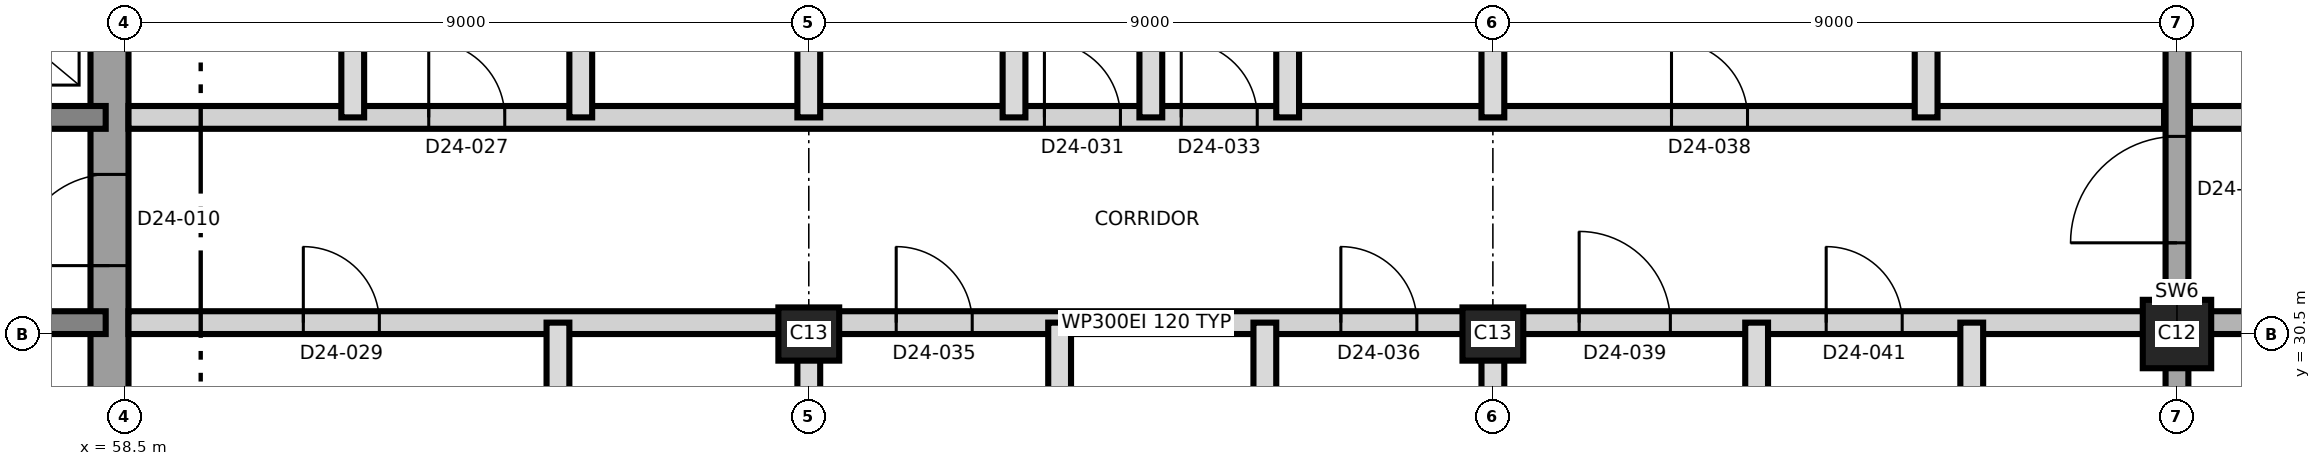
"""IFC4 building model, lengths in metres.
Left out: names, types, materials, properties, quantities, classifications, styles, units other than length and angle.
Written with IfcOpenShell. Run it as: python <this file> out.ifc"""

import sys

from ifc_helpers import new_model, si_unit, direction, frame, frame_2d, origin, origin_2d, place, context, subcontext, project, spatial, rectangle, extrude, element, fill, save


model = new_model("IFC4")
c1 = context("Model", 3, precision=1e-05, world=origin(), true_north=direction((0.0, 1.0)))
c2 = subcontext(c1, "Body", "Model", "MODEL_VIEW")
j1 = project(units=[si_unit("LENGTHUNIT", "METRE"), si_unit("PLANEANGLEUNIT", "RADIAN")], contexts=[c1])
p1 = place(None, origin())
s1 = spatial("IfcSite", under=j1, at=p1, CompositionType="ELEMENT")
p2 = place(p1, origin())
s2 = spatial("IfcBuilding", under=s1, at=p2, CompositionType="ELEMENT")
p3 = place(p2, frame((0.0, 0.0, 221.7)))
s3 = spatial("IfcBuildingStorey", under=s2, at=p3, CompositionType="ELEMENT", Elevation=221.7)
p4 = place(p3, frame((58.3, 21.25, 0.0), z_axis=(0.0, 0.0, 1.0), x_axis=(0.0, 1.0, 0.0)))
e1 = element("IfcWall", 1, at=p4, inside=s3, PredefinedType="SHEAR", context=c2, shape_type="SweptSolid", body=[
    extrude(rectangle(XDim=18.5, YDim=0.5, at=frame_2d((9.25, 0.0))), origin(), (0.0, 0.0, 1.0), 3.7),
])
p5 = place(p4, frame((10.15, 0.0, 0.0)))
e2 = element("IfcOpeningElement", 2, at=p5, cuts=e1, PredefinedType="OPENING", context=c2, shape_type="SweptSolid", body=[
    extrude(rectangle(XDim=1.2, YDim=2.1, at=frame_2d((0.6, 1.05))), frame((0.0, 0.26, 0.0), z_axis=(0.0, -1.0, 0.0), x_axis=(1.0, 0.0, 0.0)), (0.0, 0.0, 1.0), 0.52),
])
p6 = place(p3, frame((31.75, 30.65, 0.0), z_axis=(0.0, 0.0, 1.0), x_axis=(1.0, 0.0, 0.0)))
e3 = element("IfcWall", 3, at=p6, inside=s3, PredefinedType="SHEAR", context=c2, shape_type="SweptSolid", body=[
    extrude(rectangle(XDim=26.5, YDim=0.3, at=frame_2d((13.25, 0.0))), origin(), (0.0, 0.0, 1.0), 3.7),
])
p7 = place(p6, frame((24.75, 0.0, 0.0)))
e4 = element("IfcOpeningElement", 4, at=p7, cuts=e3, PredefinedType="OPENING", context=c2, shape_type="SweptSolid", body=[
    extrude(rectangle(XDim=1.0, YDim=2.1, at=frame_2d((0.5, 1.05))), frame((0.0, 0.16, 0.0), z_axis=(0.0, -1.0, 0.0), x_axis=(1.0, 0.0, 0.0)), (0.0, 0.0, 1.0), 0.32),
])
p8 = place(p3, frame((31.75, 33.35, 0.0), z_axis=(0.0, 0.0, 1.0), x_axis=(1.0, 0.0, 0.0)))
e5 = element("IfcWall", 5, at=p8, inside=s3, PredefinedType="SHEAR", context=c2, shape_type="SweptSolid", body=[
    extrude(rectangle(XDim=26.5, YDim=0.3, at=frame_2d((13.25, 0.0))), origin(), (0.0, 0.0, 1.0), 3.7),
])
p9 = place(p8, frame((13.9, 0.0, 0.0)))
e6 = element("IfcOpeningElement", 6, at=p9, cuts=e5, PredefinedType="OPENING", context=c2, shape_type="SweptSolid", body=[
    extrude(rectangle(XDim=1.4, YDim=2.1, at=frame_2d((0.7, 1.05))), frame((0.0, 0.16, 0.0), z_axis=(0.0, -1.0, 0.0), x_axis=(1.0, 0.0, 0.0)), (0.0, 0.0, 1.0), 0.32),
])
p10 = place(p8, frame((5.375, 0.0, 0.0)))
e7 = element("IfcOpeningElement", 7, at=p10, cuts=e5, PredefinedType="OPENING", context=c2, shape_type="SweptSolid", body=[
    extrude(rectangle(XDim=1.2, YDim=2.1, at=frame_2d((0.6, 1.05))), frame((0.0, 0.16, 0.0), z_axis=(0.0, -1.0, 0.0), x_axis=(1.0, 0.0, 0.0)), (0.0, 0.0, 1.0), 0.32),
])
p11 = place(p8, frame((19.925, 0.0, 0.0)))
e8 = element("IfcOpeningElement", 8, at=p11, cuts=e5, PredefinedType="OPENING", context=c2, shape_type="SweptSolid", body=[
    extrude(rectangle(XDim=1.2, YDim=2.1, at=frame_2d((0.6, 1.05))), frame((0.0, 0.16, 0.0), z_axis=(0.0, -1.0, 0.0), x_axis=(1.0, 0.0, 0.0)), (0.0, 0.0, 1.0), 0.32),
])
for number, where, z_axis, x_axis in (
    (9, (67.5, 30.5, 0.0), (0.0, 0.0, 1.0), (1.0, 0.0, 0.0)),
    (10, (76.5, 30.5, 0.0), (0.0, 0.0, 1.0), (1.0, 0.0, 0.0)),
):
    element("IfcColumn", number, at=place(p3, frame(where, z_axis=z_axis, x_axis=x_axis)), inside=s3, PredefinedType="COLUMN", context=c2, shape_type="SweptSolid", body=[
        extrude(rectangle(XDim=0.8, YDim=0.7, at=origin_2d()), origin(), (0.0, 0.0, 1.0), 3.7),
    ])
p12 = place(p3, frame((85.5, 30.5, 0.0), z_axis=(0.0, 0.0, 1.0), x_axis=(1.0, 0.0, 0.0)))
e11 = element("IfcColumn", 11, at=p12, inside=s3, PredefinedType="COLUMN", context=c2, shape_type="SweptSolid", body=[
    extrude(rectangle(XDim=0.9, YDim=0.9, at=origin_2d()), origin(), (0.0, 0.0, 1.0), 3.7),
])
p13 = place(p3, frame((85.5, 21.53, 0.0), z_axis=(0.0, 0.0, 1.0), x_axis=(0.0, 1.0, 0.0)))
e12 = element("IfcWall", 12, at=p13, inside=s3, PredefinedType="SHEAR", context=c2, shape_type="SweptSolid", body=[
    extrude(rectangle(XDim=17.94, YDim=0.3, at=frame_2d((8.97, 0.0))), origin(), (0.0, 0.0, 1.0), 3.7),
])
p14 = place(p13, frame((10.17, 0.0, 0.0)))
e13 = element("IfcOpeningElement", 13, at=p14, cuts=e12, PredefinedType="OPENING", context=c2, shape_type="SweptSolid", body=[
    extrude(rectangle(XDim=1.4, YDim=2.1, at=frame_2d((0.7, 1.05))), frame((0.0, 0.16, 0.0), z_axis=(0.0, -1.0, 0.0), x_axis=(1.0, 0.0, 0.0)), (0.0, 0.0, 1.0), 0.32),
])
p15 = place(p3, frame((58.55, 30.65, 0.0), z_axis=(0.0, 0.0, 1.0), x_axis=(1.0, 0.0, 0.0)))
e14 = element("IfcWall", 14, at=p15, inside=s3, PredefinedType="PARTITIONING", context=c2, shape_type="SweptSolid", body=[
    extrude(rectangle(XDim=26.78, YDim=0.3, at=frame_2d((13.39, 0.0))), origin(), (0.0, 0.0, 1.0), 3.4),
])
p16 = place(p15, frame((2.3, 0.0, 0.0)))
e15 = element("IfcOpeningElement", 15, at=p16, cuts=e14, PredefinedType="OPENING", context=c2, shape_type="SweptSolid", body=[
    extrude(rectangle(XDim=1.0, YDim=2.4, at=frame_2d((0.5, 1.2))), frame((0.0, 0.16, 0.0), z_axis=(0.0, -1.0, 0.0), x_axis=(1.0, 0.0, 0.0)), (0.0, 0.0, 1.0), 0.32),
])
p17 = place(p15, frame((10.1, 0.0, 0.0)))
e16 = element("IfcOpeningElement", 16, at=p17, cuts=e14, PredefinedType="OPENING", context=c2, shape_type="SweptSolid", body=[
    extrude(rectangle(XDim=1.0, YDim=2.1, at=frame_2d((0.5, 1.05))), frame((0.0, 0.16, 0.0), z_axis=(0.0, -1.0, 0.0), x_axis=(1.0, 0.0, 0.0)), (0.0, 0.0, 1.0), 0.32),
])
p18 = place(p15, frame((15.95, 0.0, 0.0)))
e17 = element("IfcOpeningElement", 17, at=p18, cuts=e14, PredefinedType="OPENING", context=c2, shape_type="SweptSolid", body=[
    extrude(rectangle(XDim=1.0, YDim=2.1, at=frame_2d((0.5, 1.05))), frame((0.0, 0.16, 0.0), z_axis=(0.0, -1.0, 0.0), x_axis=(1.0, 0.0, 0.0)), (0.0, 0.0, 1.0), 0.32),
])
p19 = place(p15, frame((19.085, 0.0, 0.0)))
e18 = element("IfcOpeningElement", 18, at=p19, cuts=e14, PredefinedType="OPENING", context=c2, shape_type="SweptSolid", body=[
    extrude(rectangle(XDim=1.2, YDim=2.1, at=frame_2d((0.6, 1.05))), frame((0.0, 0.16, 0.0), z_axis=(0.0, -1.0, 0.0), x_axis=(1.0, 0.0, 0.0)), (0.0, 0.0, 1.0), 0.32),
])
p20 = place(p15, frame((22.335, 0.0, 0.0)))
e19 = element("IfcOpeningElement", 19, at=p20, cuts=e14, PredefinedType="OPENING", context=c2, shape_type="SweptSolid", body=[
    extrude(rectangle(XDim=1.0, YDim=2.1, at=frame_2d((0.5, 1.05))), frame((0.0, 0.16, 0.0), z_axis=(0.0, -1.0, 0.0), x_axis=(1.0, 0.0, 0.0)), (0.0, 0.0, 1.0), 0.32),
])
p21 = place(p3, frame((85.67, 30.65, 0.0), z_axis=(0.0, 0.0, 1.0), x_axis=(1.0, 0.0, 0.0)))
e20 = element("IfcWall", 20, at=p21, inside=s3, PredefinedType="SHEAR", context=c2, shape_type="SweptSolid", body=[
    extrude(rectangle(XDim=8.8, YDim=0.3, at=frame_2d((4.4, 0.0))), origin(), (0.0, 0.0, 1.0), 3.4),
])
p22 = place(p21, frame((2.08, 0.0, 0.0)))
e21 = element("IfcOpeningElement", 21, at=p22, cuts=e20, PredefinedType="OPENING", context=c2, shape_type="SweptSolid", body=[
    extrude(rectangle(XDim=1.2, YDim=2.1, at=frame_2d((0.6, 1.05))), frame((0.0, 0.16, 0.0), z_axis=(0.0, -1.0, 0.0), x_axis=(1.0, 0.0, 0.0)), (0.0, 0.0, 1.0), 0.32),
])
p23 = place(p21, frame((5.63, 0.0, 0.0)))
e22 = element("IfcOpeningElement", 22, at=p23, cuts=e20, PredefinedType="OPENING", context=c2, shape_type="SweptSolid", body=[
    extrude(rectangle(XDim=1.0, YDim=2.1, at=frame_2d((0.5, 1.05))), frame((0.0, 0.16, 0.0), z_axis=(0.0, -1.0, 0.0), x_axis=(1.0, 0.0, 0.0)), (0.0, 0.0, 1.0), 0.32),
])
p24 = place(p3, frame((58.55, 33.35, 0.0), z_axis=(0.0, 0.0, 1.0), x_axis=(1.0, 0.0, 0.0)))
e23 = element("IfcWall", 23, at=p24, inside=s3, PredefinedType="PARTITIONING", context=c2, shape_type="SweptSolid", body=[
    extrude(rectangle(XDim=26.78, YDim=0.3, at=frame_2d((13.39, 0.0))), origin(), (0.0, 0.0, 1.0), 3.4),
])
p25 = place(p24, frame((3.95, 0.0, 0.0)))
e24 = element("IfcOpeningElement", 24, at=p25, cuts=e23, PredefinedType="OPENING", context=c2, shape_type="SweptSolid", body=[
    extrude(rectangle(XDim=1.0, YDim=2.4, at=frame_2d((0.5, 1.2))), frame((0.0, 0.16, 0.0), z_axis=(0.0, -1.0, 0.0), x_axis=(1.0, 0.0, 0.0)), (0.0, 0.0, 1.0), 0.32),
])
p26 = place(p24, frame((12.05, 0.0, 0.0)))
e25 = element("IfcOpeningElement", 25, at=p26, cuts=e23, PredefinedType="OPENING", context=c2, shape_type="SweptSolid", body=[
    extrude(rectangle(XDim=1.0, YDim=2.1, at=frame_2d((0.5, 1.05))), frame((0.0, 0.16, 0.0), z_axis=(0.0, -1.0, 0.0), x_axis=(1.0, 0.0, 0.0)), (0.0, 0.0, 1.0), 0.32),
])
p27 = place(p24, frame((13.85, 0.0, 0.0)))
e26 = element("IfcOpeningElement", 26, at=p27, cuts=e23, PredefinedType="OPENING", context=c2, shape_type="SweptSolid", body=[
    extrude(rectangle(XDim=1.0, YDim=2.1, at=frame_2d((0.5, 1.05))), frame((0.0, 0.16, 0.0), z_axis=(0.0, -1.0, 0.0), x_axis=(1.0, 0.0, 0.0)), (0.0, 0.0, 1.0), 0.32),
])
p28 = place(p24, frame((20.3, 0.0, 0.0)))
e27 = element("IfcOpeningElement", 27, at=p28, cuts=e23, PredefinedType="OPENING", context=c2, shape_type="SweptSolid", body=[
    extrude(rectangle(XDim=1.0, YDim=2.4, at=frame_2d((0.5, 1.2))), frame((0.0, 0.16, 0.0), z_axis=(0.0, -1.0, 0.0), x_axis=(1.0, 0.0, 0.0)), (0.0, 0.0, 1.0), 0.32),
])
p29 = place(p3, frame((85.67, 33.35, 0.0), z_axis=(0.0, 0.0, 1.0), x_axis=(1.0, 0.0, 0.0)))
e28 = element("IfcWall", 28, at=p29, inside=s3, PredefinedType="PARTITIONING", context=c2, shape_type="SweptSolid", body=[
    extrude(rectangle(XDim=8.685, YDim=0.3, at=frame_2d((4.343, 0.0))), origin(), (0.0, 0.0, 1.0), 3.4),
])
p30 = place(p29, frame((1.83, 0.0, 0.0)))
e29 = element("IfcOpeningElement", 29, at=p30, cuts=e28, PredefinedType="OPENING", context=c2, shape_type="SweptSolid", body=[
    extrude(rectangle(XDim=1.0, YDim=2.1, at=frame_2d((0.5, 1.05))), frame((0.0, 0.16, 0.0), z_axis=(0.0, -1.0, 0.0), x_axis=(1.0, 0.0, 0.0)), (0.0, 0.0, 1.0), 0.32),
])
p31 = place(p29, frame((5.63, 0.0, 0.0)))
e30 = element("IfcOpeningElement", 30, at=p31, cuts=e28, PredefinedType="OPENING", context=c2, shape_type="SweptSolid", body=[
    extrude(rectangle(XDim=1.0, YDim=2.1, at=frame_2d((0.5, 1.05))), frame((0.0, 0.16, 0.0), z_axis=(0.0, -1.0, 0.0), x_axis=(1.0, 0.0, 0.0)), (0.0, 0.0, 1.0), 0.32),
])
p32 = place(p3, frame((61.5, 33.35, 0.0), z_axis=(0.0, 0.0, 1.0), x_axis=(0.0, 1.0, 0.0)))
e31 = element("IfcWall", 31, at=p32, inside=s3, PredefinedType="PARTITIONING", context=c2, shape_type="SweptSolid", body=[
    extrude(rectangle(XDim=3.3, YDim=0.3, at=frame_2d((1.65, 0.0))), origin(), (0.0, 0.0, 1.0), 3.4),
])
p33 = place(p3, frame((64.2, 27.15, 0.0), z_axis=(0.0, 0.0, 1.0), x_axis=(0.0, 1.0, 0.0)))
e32 = element("IfcWall", 32, at=p33, inside=s3, PredefinedType="PARTITIONING", context=c2, shape_type="SweptSolid", body=[
    extrude(rectangle(XDim=3.5, YDim=0.3, at=frame_2d((1.75, 0.0))), origin(), (0.0, 0.0, 1.0), 3.4),
])
p34 = place(p3, frame((64.5, 33.35, 0.0), z_axis=(0.0, 0.0, 1.0), x_axis=(0.0, 1.0, 0.0)))
e33 = element("IfcWall", 33, at=p34, inside=s3, PredefinedType="PARTITIONING", context=c2, shape_type="SweptSolid", body=[
    extrude(rectangle(XDim=3.3, YDim=0.3, at=frame_2d((1.65, 0.0))), origin(), (0.0, 0.0, 1.0), 3.4),
])
p35 = place(p3, frame((67.5, 21.53, 0.0), z_axis=(0.0, 0.0, 1.0), x_axis=(0.0, 1.0, 0.0)))
e34 = element("IfcWall", 34, at=p35, inside=s3, PredefinedType="PARTITIONING", context=c2, shape_type="SweptSolid", body=[
    extrude(rectangle(XDim=9.12, YDim=0.3, at=frame_2d((4.56, 0.0))), origin(), (0.0, 0.0, 1.0), 3.4),
])
p36 = place(p3, frame((67.5, 33.35, 0.0), z_axis=(0.0, 0.0, 1.0), x_axis=(0.0, 1.0, 0.0)))
e35 = element("IfcWall", 35, at=p36, inside=s3, PredefinedType="PARTITIONING", context=c2, shape_type="SweptSolid", body=[
    extrude(rectangle(XDim=6.12, YDim=0.3, at=frame_2d((3.06, 0.0))), origin(), (0.0, 0.0, 1.0), 3.4),
])
for number, where, z_axis, x_axis in (
    (36, (70.2, 33.35, 0.0), (0.0, 0.0, 1.0), (0.0, 1.0, 0.0)),
    (37, (70.8, 27.45, 0.0), (0.0, 0.0, 1.0), (0.0, 1.0, 0.0)),
):
    element("IfcWall", number, at=place(p3, frame(where, z_axis=z_axis, x_axis=x_axis)), inside=s3, PredefinedType="PARTITIONING", context=c2, shape_type="SweptSolid", body=[
        extrude(rectangle(XDim=3.2, YDim=0.3, at=frame_2d((1.6, 0.0))), origin(), (0.0, 0.0, 1.0), 3.4),
    ])
p37 = place(p3, frame((72.0, 33.35, 0.0), z_axis=(0.0, 0.0, 1.0), x_axis=(0.0, 1.0, 0.0)))
e38 = element("IfcWall", 38, at=p37, inside=s3, PredefinedType="PARTITIONING", context=c2, shape_type="SweptSolid", body=[
    extrude(rectangle(XDim=6.3, YDim=0.3, at=frame_2d((3.15, 0.0))), origin(), (0.0, 0.0, 1.0), 3.4),
])
p38 = place(p3, frame((73.5, 21.53, 0.0), z_axis=(0.0, 0.0, 1.0), x_axis=(0.0, 1.0, 0.0)))
e39 = element("IfcWall", 39, at=p38, inside=s3, PredefinedType="PARTITIONING", context=c2, shape_type="SweptSolid", body=[
    extrude(rectangle(XDim=9.12, YDim=0.3, at=frame_2d((4.56, 0.0))), origin(), (0.0, 0.0, 1.0), 3.4),
])
p39 = place(p3, frame((73.8, 33.35, 0.0), z_axis=(0.0, 0.0, 1.0), x_axis=(0.0, 1.0, 0.0)))
e40 = element("IfcWall", 40, at=p39, inside=s3, PredefinedType="PARTITIONING", context=c2, shape_type="SweptSolid", body=[
    extrude(rectangle(XDim=3.2, YDim=0.3, at=frame_2d((1.6, 0.0))), origin(), (0.0, 0.0, 1.0), 3.4),
])
p40 = place(p3, frame((76.5, 21.53, 0.0), z_axis=(0.0, 0.0, 1.0), x_axis=(0.0, 1.0, 0.0)))
e41 = element("IfcWall", 41, at=p40, inside=s3, PredefinedType="PARTITIONING", context=c2, shape_type="SweptSolid", body=[
    extrude(rectangle(XDim=9.12, YDim=0.3, at=frame_2d((4.56, 0.0))), origin(), (0.0, 0.0, 1.0), 3.4),
])
p41 = place(p3, frame((76.5, 33.35, 0.0), z_axis=(0.0, 0.0, 1.0), x_axis=(0.0, 1.0, 0.0)))
e42 = element("IfcWall", 42, at=p41, inside=s3, PredefinedType="PARTITIONING", context=c2, shape_type="SweptSolid", body=[
    extrude(rectangle(XDim=6.12, YDim=0.3, at=frame_2d((3.06, 0.0))), origin(), (0.0, 0.0, 1.0), 3.4),
])
p42 = place(p3, frame((79.97, 21.53, 0.0), z_axis=(0.0, 0.0, 1.0), x_axis=(0.0, 1.0, 0.0)))
e43 = element("IfcWall", 43, at=p42, inside=s3, PredefinedType="PARTITIONING", context=c2, shape_type="SweptSolid", body=[
    extrude(rectangle(XDim=9.12, YDim=0.3, at=frame_2d((4.56, 0.0))), origin(), (0.0, 0.0, 1.0), 3.4),
])
p43 = place(p3, frame((82.2, 33.35, 0.0), z_axis=(0.0, 0.0, 1.0), x_axis=(0.0, 1.0, 0.0)))
e44 = element("IfcWall", 44, at=p43, inside=s3, PredefinedType="PARTITIONING", context=c2, shape_type="SweptSolid", body=[
    extrude(rectangle(XDim=3.5, YDim=0.3, at=frame_2d((1.75, 0.0))), origin(), (0.0, 0.0, 1.0), 3.4),
])
p44 = place(p3, frame((82.8, 27.45, 0.0), z_axis=(0.0, 0.0, 1.0), x_axis=(0.0, 1.0, 0.0)))
e45 = element("IfcWall", 45, at=p44, inside=s3, PredefinedType="PARTITIONING", context=c2, shape_type="SweptSolid", body=[
    extrude(rectangle(XDim=3.2, YDim=0.3, at=frame_2d((1.6, 0.0))), origin(), (0.0, 0.0, 1.0), 3.4),
])
p45 = place(p5, origin())
e46 = element("IfcDoor", 46, at=p45, inside=s3, OperationType="SINGLE_SWING_LEFT", PredefinedType="DOOR", context=c2, shape_type="SweptSolid", body=[
    extrude(rectangle(XDim=1.2, YDim=2.1, at=frame_2d((0.6, 1.05))), frame((0.0, 0.025, 0.0), z_axis=(0.0, -1.0, 0.0), x_axis=(1.0, 0.0, 0.0)), (0.0, 0.0, 1.0), 0.05),
])
fill(e2, e46)
p46 = place(p25, origin())
e47 = element("IfcDoor", 47, at=p46, inside=s3, OperationType="SINGLE_SWING_LEFT", PredefinedType="DOOR", context=c2, shape_type="SweptSolid", body=[
    extrude(rectangle(XDim=1.0, YDim=2.4, at=frame_2d((0.5, 1.2))), frame((0.0, 0.025, 0.0), z_axis=(0.0, -1.0, 0.0), x_axis=(1.0, 0.0, 0.0)), (0.0, 0.0, 1.0), 0.05),
])
fill(e24, e47)
p47 = place(p16, origin())
e48 = element("IfcDoor", 48, at=p47, inside=s3, OperationType="SINGLE_SWING_LEFT", PredefinedType="DOOR", context=c2, shape_type="SweptSolid", body=[
    extrude(rectangle(XDim=1.0, YDim=2.4, at=frame_2d((0.5, 1.2))), frame((0.0, 0.025, 0.0), z_axis=(0.0, -1.0, 0.0), x_axis=(1.0, 0.0, 0.0)), (0.0, 0.0, 1.0), 0.05),
])
fill(e15, e48)
p48 = place(p26, origin())
e49 = element("IfcDoor", 49, at=p48, inside=s3, OperationType="SINGLE_SWING_RIGHT", PredefinedType="DOOR", context=c2, shape_type="SweptSolid", body=[
    extrude(rectangle(XDim=1.0, YDim=2.1, at=frame_2d((0.5, 1.05))), frame((0.0, 0.025, 0.0), z_axis=(0.0, -1.0, 0.0), x_axis=(1.0, 0.0, 0.0)), (0.0, 0.0, 1.0), 0.05),
])
fill(e25, e49)
p49 = place(p27, origin())
e50 = element("IfcDoor", 50, at=p49, inside=s3, OperationType="SINGLE_SWING_LEFT", PredefinedType="DOOR", context=c2, shape_type="SweptSolid", body=[
    extrude(rectangle(XDim=1.0, YDim=2.1, at=frame_2d((0.5, 1.05))), frame((0.0, 0.025, 0.0), z_axis=(0.0, -1.0, 0.0), x_axis=(1.0, 0.0, 0.0)), (0.0, 0.0, 1.0), 0.05),
])
fill(e26, e50)
p50 = place(p17, origin())
e51 = element("IfcDoor", 51, at=p50, inside=s3, OperationType="SINGLE_SWING_LEFT", PredefinedType="DOOR", context=c2, shape_type="SweptSolid", body=[
    extrude(rectangle(XDim=1.0, YDim=2.1, at=frame_2d((0.5, 1.05))), frame((0.0, 0.025, 0.0), z_axis=(0.0, -1.0, 0.0), x_axis=(1.0, 0.0, 0.0)), (0.0, 0.0, 1.0), 0.05),
])
fill(e16, e51)
p51 = place(p18, origin())
e52 = element("IfcDoor", 52, at=p51, inside=s3, OperationType="SINGLE_SWING_RIGHT", PredefinedType="DOOR", context=c2, shape_type="SweptSolid", body=[
    extrude(rectangle(XDim=1.0, YDim=2.1, at=frame_2d((0.5, 1.05))), frame((0.0, 0.025, 0.0), z_axis=(0.0, -1.0, 0.0), x_axis=(1.0, 0.0, 0.0)), (0.0, 0.0, 1.0), 0.05),
])
fill(e17, e52)
p52 = place(p28, origin())
e53 = element("IfcDoor", 53, at=p52, inside=s3, OperationType="SINGLE_SWING_LEFT", PredefinedType="DOOR", context=c2, shape_type="SweptSolid", body=[
    extrude(rectangle(XDim=1.0, YDim=2.4, at=frame_2d((0.5, 1.2))), frame((0.0, 0.025, 0.0), z_axis=(0.0, -1.0, 0.0), x_axis=(1.0, 0.0, 0.0)), (0.0, 0.0, 1.0), 0.05),
])
fill(e27, e53)
p53 = place(p19, origin())
e54 = element("IfcDoor", 54, at=p53, inside=s3, OperationType="SINGLE_SWING_RIGHT", PredefinedType="DOOR", context=c2, shape_type="SweptSolid", body=[
    extrude(rectangle(XDim=1.2, YDim=2.1, at=frame_2d((0.6, 1.05))), frame((0.0, 0.025, 0.0), z_axis=(0.0, -1.0, 0.0), x_axis=(1.0, 0.0, 0.0)), (0.0, 0.0, 1.0), 0.05),
])
fill(e18, e54)
p54 = place(p20, origin())
e55 = element("IfcDoor", 55, at=p54, inside=s3, OperationType="SINGLE_SWING_LEFT", PredefinedType="DOOR", context=c2, shape_type="SweptSolid", body=[
    extrude(rectangle(XDim=1.0, YDim=2.1, at=frame_2d((0.5, 1.05))), frame((0.0, 0.025, 0.0), z_axis=(0.0, -1.0, 0.0), x_axis=(1.0, 0.0, 0.0)), (0.0, 0.0, 1.0), 0.05),
])
fill(e19, e55)
p55 = place(p14, origin())
e56 = element("IfcDoor", 56, at=p55, inside=s3, OperationType="SINGLE_SWING_RIGHT", PredefinedType="DOOR", context=c2, shape_type="SweptSolid", body=[
    extrude(rectangle(XDim=1.4, YDim=2.1, at=frame_2d((0.7, 1.05))), frame((0.0, 0.025, 0.0), z_axis=(0.0, -1.0, 0.0), x_axis=(1.0, 0.0, 0.0)), (0.0, 0.0, 1.0), 0.05),
])
fill(e13, e56)
save(model, sys.argv[1])
